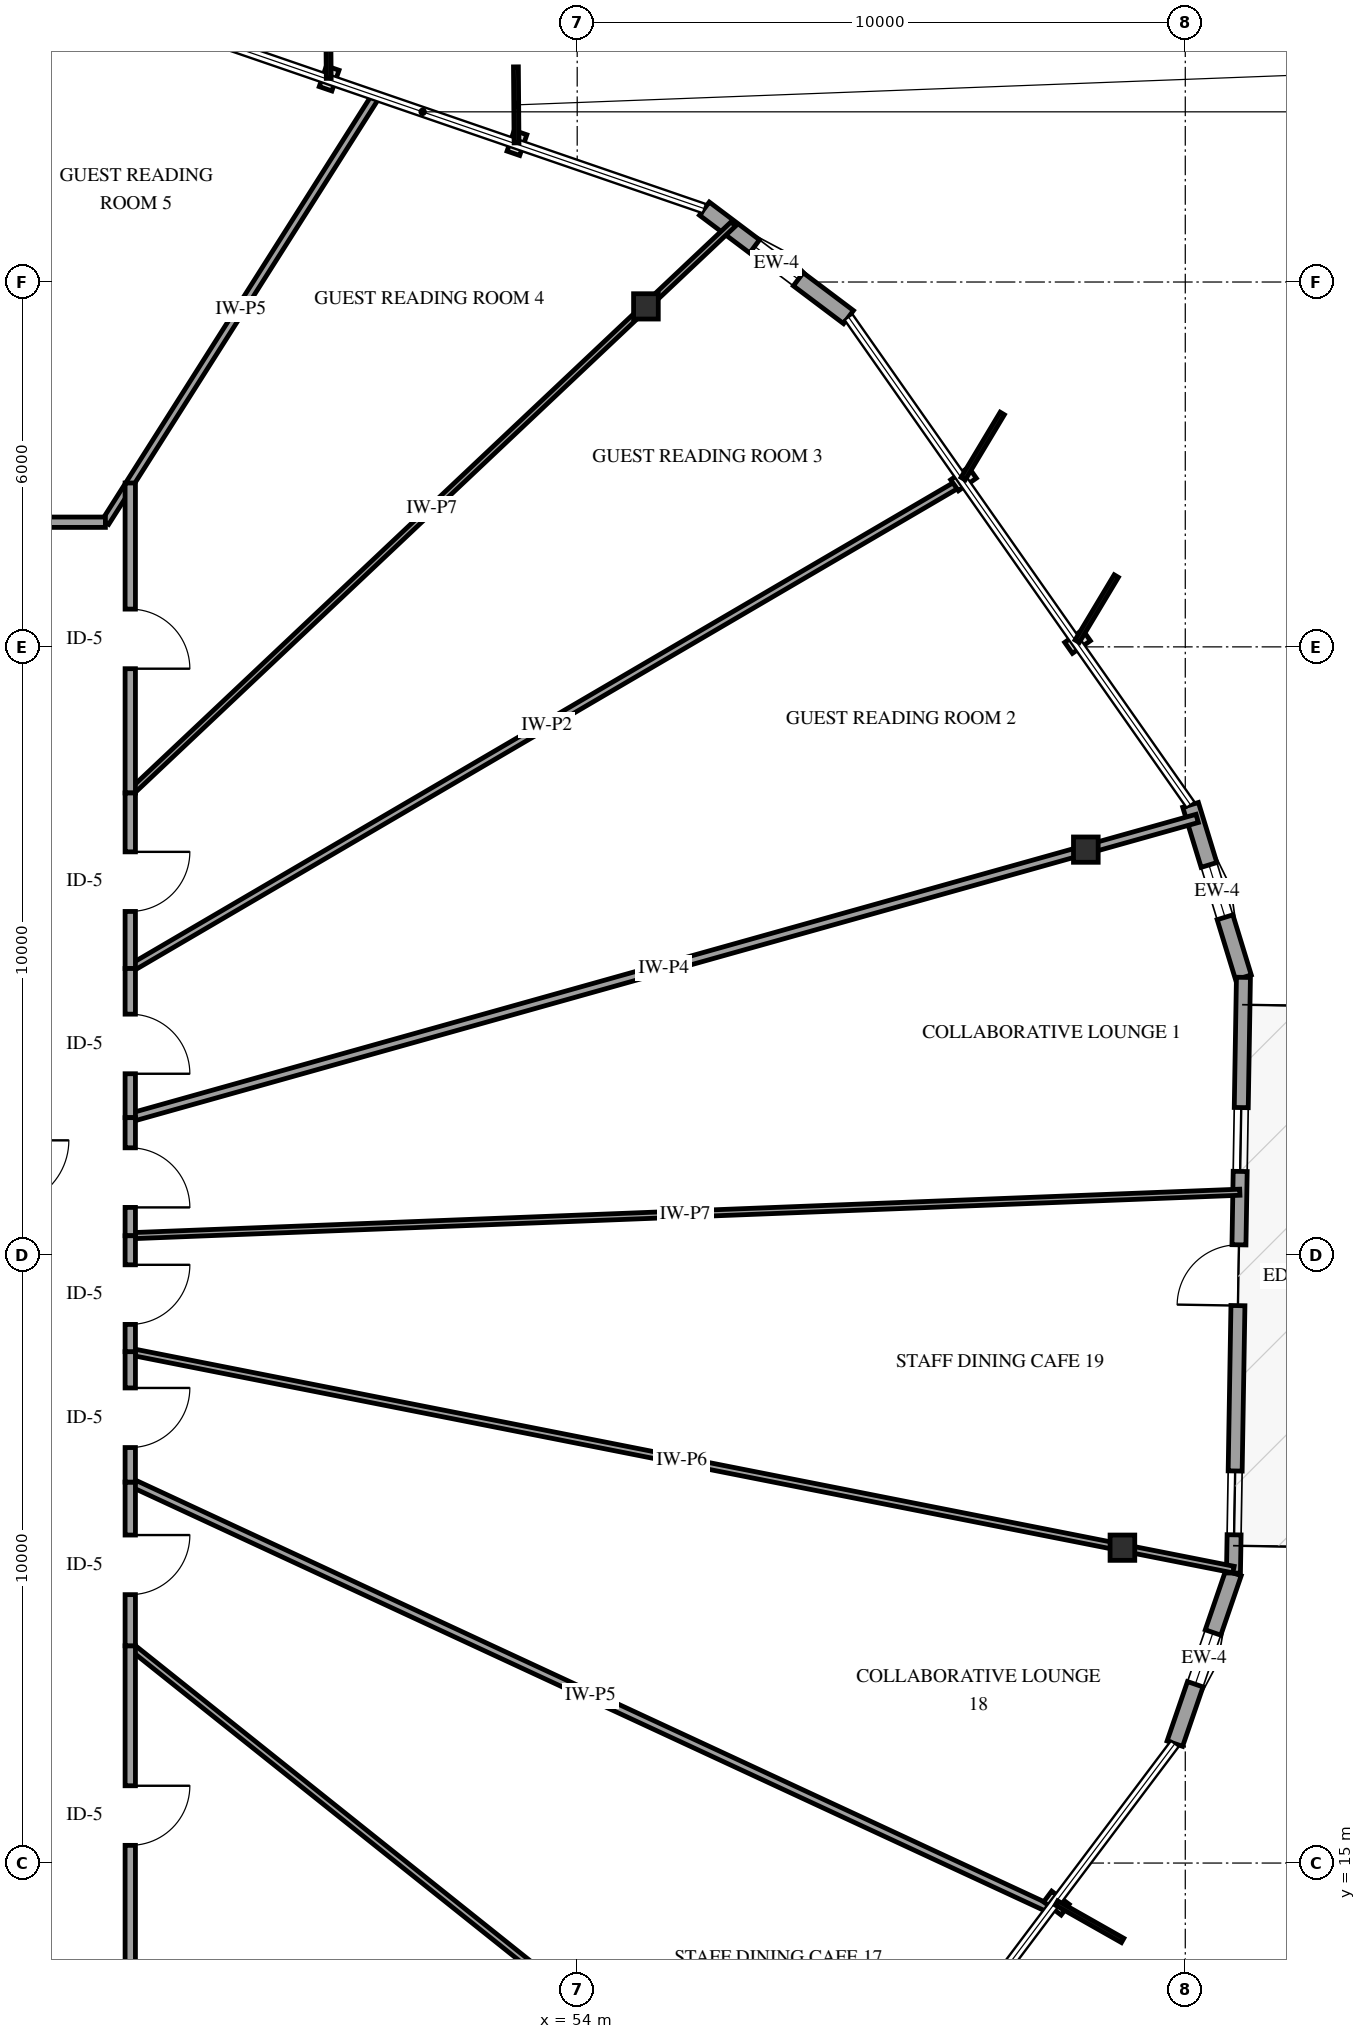
"""IFC4 building model, lengths in metres.
Left out: names, types, materials, properties, quantities, classifications, styles, units other than length and angle.
Written with IfcOpenShell. Run it as: python <this file> out.ifc"""

import sys

from ifc_helpers import new_model, si_unit, direction, frame, frame_2d, origin, origin_2d, place, context, subcontext, project, spatial, rectangle, i_section, extrude, element, fill, save


model = new_model("IFC4")
c1 = context("Model", 3, precision=1e-05, world=origin(), true_north=direction((0.0, 1.0)))
c2 = subcontext(c1, "Body", "Model", "MODEL_VIEW")
j1 = project(units=[si_unit("LENGTHUNIT", "METRE"), si_unit("PLANEANGLEUNIT", "RADIAN")], contexts=[c1])
p1 = place(None, origin())
s1 = spatial("IfcSite", under=j1, at=p1, CompositionType="ELEMENT")
p2 = place(p1, origin())
s2 = spatial("IfcBuilding", under=s1, at=p2, CompositionType="ELEMENT")
p3 = place(p2, frame((0.0, 0.0, 226.6)))
s3 = spatial("IfcBuildingStorey", under=s2, at=p3, CompositionType="ELEMENT", Elevation=226.6)
for number, where, z_axis, x_axis in (
    (1, (62.365, 31.666, 0.0), (0.0, 0.0, 1.0), (1.0, 0.0, 0.0)),
    (2, (55.13, 40.599, 0.0), (0.0, 0.0, 1.0), (1.0, 0.0, 0.0)),
    (3, (62.966, 20.186, 0.0), (0.0, 0.0, 1.0), (1.0, 0.0, 0.0)),
):
    element("IfcColumn", number, at=place(p3, frame(where, z_axis=z_axis, x_axis=x_axis)), inside=s3, PredefinedType="COLUMN", context=c2, shape_type="SweptSolid", body=[
        extrude(i_section(OverallWidth=0.406, OverallDepth=0.416, WebThickness=0.03, FlangeThickness=0.048, FilletRadius=0.038, at=origin_2d()), origin(), (0.0, 0.0, 1.0), 3.6),
    ])
p4 = place(p3, frame((63.828, 16.963, 0.0), z_axis=(0.0, 0.0, 1.0), x_axis=(0.324904964625, 0.945746670077, 0.0)))
e4 = element("IfcWall", 4, at=p4, inside=s3, PredefinedType="SOLIDWALL", context=c2, shape_type="SweptSolid", body=[
    extrude(rectangle(XDim=2.967, YDim=0.27, at=frame_2d((1.483, 0.0))), origin(), (0.0, 0.0, 1.0), 2.679),
])
p5 = place(p4, frame((1.033, 0.0, 0.75)))
e5 = element("IfcOpeningElement", 5, at=p5, cuts=e4, PredefinedType="OPENING", context=c2, shape_type="SweptSolid", body=[
    extrude(rectangle(XDim=0.9, YDim=1.5, at=frame_2d((0.45, 0.75))), frame((0.0, 0.145, 0.0), z_axis=(0.0, -1.0, 0.0), x_axis=(1.0, 0.0, 0.0)), (0.0, 0.0, 1.0), 0.29),
])
p6 = place(p3, frame((64.956, 29.565, 0.0), z_axis=(0.0, 0.0, 1.0), x_axis=(-0.293050545602, 0.95609694996, 0.0)))
e6 = element("IfcWall", 6, at=p6, inside=s3, PredefinedType="SOLIDWALL", context=c2, shape_type="SweptSolid", body=[
    extrude(rectangle(XDim=2.967, YDim=0.27, at=frame_2d((1.483, 0.0))), origin(), (0.0, 0.0, 1.0), 2.679),
])
p7 = place(p6, frame((1.033, 0.0, 0.75)))
e7 = element("IfcOpeningElement", 7, at=p7, cuts=e6, PredefinedType="OPENING", context=c2, shape_type="SweptSolid", body=[
    extrude(rectangle(XDim=0.9, YDim=1.5, at=frame_2d((0.45, 0.75))), frame((0.0, 0.145, 0.0), z_axis=(0.0, -1.0, 0.0), x_axis=(1.0, 0.0, 0.0)), (0.0, 0.0, 1.0), 0.29),
])
p8 = place(p3, frame((64.792, 19.769, 0.0), z_axis=(0.0, 0.0, 1.0), x_axis=(0.016744898116, 0.999859794365, 0.0)))
e8 = element("IfcWall", 8, at=p8, inside=s3, PredefinedType="SOLIDWALL", context=c2, shape_type="SweptSolid", body=[
    extrude(rectangle(XDim=9.798, YDim=0.23, at=frame_2d((4.899, 0.0))), origin(), (0.0, 0.0, 1.0), 2.679),
])
p9 = place(p8, frame((4.399, 0.0, 0.0)))
e9 = element("IfcOpeningElement", 9, at=p9, cuts=e8, PredefinedType="OPENING", context=c2, shape_type="SweptSolid", body=[
    extrude(rectangle(XDim=1.0, YDim=2.15, at=frame_2d((0.5, 1.075))), frame((0.0, 0.125, 0.0), z_axis=(0.0, -1.0, 0.0), x_axis=(1.0, 0.0, 0.0)), (0.0, 0.0, 1.0), 0.25),
])
p10 = place(p8, frame((0.629, 0.0, 0.72)))
e10 = element("IfcOpeningElement", 10, at=p10, cuts=e8, PredefinedType="OPENING", context=c2, shape_type="SweptSolid", body=[
    extrude(rectangle(XDim=1.05, YDim=1.55, at=frame_2d((0.525, 0.775))), frame((0.0, 0.125, 0.0), z_axis=(0.0, -1.0, 0.0), x_axis=(1.0, 0.0, 0.0)), (0.0, 0.0, 1.0), 0.25),
])
p11 = place(p8, frame((6.606, 0.0, 0.72)))
e11 = element("IfcOpeningElement", 11, at=p11, cuts=e8, PredefinedType="OPENING", context=c2, shape_type="SweptSolid", body=[
    extrude(rectangle(XDim=1.05, YDim=1.55, at=frame_2d((0.525, 0.775))), frame((0.0, 0.125, 0.0), z_axis=(0.0, -1.0, 0.0), x_axis=(1.0, 0.0, 0.0)), (0.0, 0.0, 1.0), 0.25),
])
p12 = place(p3, frame((58.462, 40.423, 0.0), z_axis=(0.0, 0.0, 1.0), x_axis=(-0.799041019951, 0.601276515786, 0.0)))
e12 = element("IfcWall", 12, at=p12, inside=s3, PredefinedType="SOLIDWALL", context=c2, shape_type="SweptSolid", body=[
    extrude(rectangle(XDim=2.967, YDim=0.27, at=frame_2d((1.483, 0.0))), origin(), (0.0, 0.0, 1.0), 2.679),
])
p13 = place(p12, frame((1.033, 0.0, 0.75)))
e13 = element("IfcOpeningElement", 13, at=p13, cuts=e12, PredefinedType="OPENING", context=c2, shape_type="SweptSolid", body=[
    extrude(rectangle(XDim=0.9, YDim=1.5, at=frame_2d((0.45, 0.75))), frame((0.0, 0.145, 0.0), z_axis=(0.0, -1.0, 0.0), x_axis=(1.0, 0.0, 0.0)), (0.0, 0.0, 1.0), 0.29),
])
p14 = place(p3, frame((46.65, 23.41, 0.0), z_axis=(0.0, 0.0, 1.0), x_axis=(0.981042007035, -0.193795202294, 0.0)))
e14 = element("IfcWall", 14, at=p14, inside=s3, PredefinedType="PARTITIONING", context=c2, shape_type="SweptSolid", body=[
    extrude(rectangle(XDim=18.494, YDim=0.11, at=frame_2d((9.247, 0.0))), origin(), (0.0, 0.0, 1.0), 2.595),
])
p15 = place(p3, frame((64.897, 26.032, 0.0), z_axis=(0.0, 0.0, 1.0), x_axis=(-0.999230893131, -0.039212526218, 0.0)))
e15 = element("IfcWall", 15, at=p15, inside=s3, PredefinedType="PARTITIONING", context=c2, shape_type="SweptSolid", body=[
    extrude(rectangle(XDim=18.261, YDim=0.1, at=frame_2d((9.131, 0.0))), origin(), (0.0, 0.0, 1.0), 3.3),
])
p16 = place(p3, frame((46.65, 27.258, 0.0), z_axis=(0.0, 0.0, 1.0), x_axis=(0.962850255887, 0.270035895277, 0.0)))
e16 = element("IfcWall", 16, at=p16, inside=s3, PredefinedType="PARTITIONING", context=c2, shape_type="SweptSolid", body=[
    extrude(rectangle(XDim=18.223, YDim=0.14, at=frame_2d((9.112, 0.0))), origin(), (0.0, 0.0, 1.0), 3.3),
])
p17 = place(p3, frame((46.65, 21.265, 0.0), z_axis=(0.0, 0.0, 1.0), x_axis=(0.907114550352, -0.420883823091, 0.0)))
e17 = element("IfcWall", 17, at=p17, inside=s3, PredefinedType="PARTITIONING", context=c2, shape_type="SweptSolid", body=[
    extrude(rectangle(XDim=16.682, YDim=0.13, at=frame_2d((8.341, 0.0))), origin(), (0.0, 0.0, 1.0), 3.3),
])
p18 = place(p3, frame((46.65, 29.711, 0.0), z_axis=(0.0, 0.0, 1.0), x_axis=(0.863115514212, 0.505006543648, 0.0)))
e18 = element("IfcWall", 18, at=p18, inside=s3, PredefinedType="PARTITIONING", context=c2, shape_type="SweptSolid", body=[
    extrude(rectangle(XDim=15.875, YDim=0.12, at=frame_2d((7.938, 0.0))), origin(), (0.0, 0.0, 1.0), 3.3),
])
p19 = place(p3, frame((46.65, 18.573, 0.0), z_axis=(0.0, 0.0, 1.0), x_axis=(0.781476039423, -0.623935252897, 0.0)))
e19 = element("IfcWall", 19, at=p19, inside=s3, PredefinedType="PARTITIONING", context=c2, shape_type="SweptSolid", body=[
    extrude(rectangle(XDim=14.7, YDim=0.11, at=frame_2d((7.35, 0.0))), origin(), (0.0, 0.0, 1.0), 3.3),
])
p20 = place(p3, frame((46.65, 32.597, 0.0), z_axis=(0.0, 0.0, 1.0), x_axis=(0.72733783117, 0.686279592695, 0.0)))
e20 = element("IfcWall", 20, at=p20, inside=s3, PredefinedType="PARTITIONING", context=c2, shape_type="SweptSolid", body=[
    extrude(rectangle(XDim=13.635, YDim=0.1, at=frame_2d((6.817, 0.0))), origin(), (0.0, 0.0, 1.0), 2.595),
])
p21 = place(p3, frame((46.241, 37.05, 0.0), z_axis=(0.0, 0.0, 1.0), x_axis=(0.535691842885, 0.844413553578, 0.0)))
e21 = element("IfcWall", 21, at=p21, inside=s3, PredefinedType="PARTITIONING", context=c2, shape_type="SweptSolid", body=[
    extrude(rectangle(XDim=8.305, YDim=0.13, at=frame_2d((4.153, 0.0))), origin(), (0.0, 0.0, 1.0), 3.3),
])
p22 = place(p3, frame((46.65, 18.573, 0.0), z_axis=(0.0, 0.0, 1.0), x_axis=(0.0, -1.0, 0.0)))
e22 = element("IfcWall", 22, at=p22, inside=s3, PredefinedType="PARTITIONING", context=c2, shape_type="SweptSolid", body=[
    extrude(rectangle(XDim=5.553, YDim=0.17, at=frame_2d((2.776, 0.0))), origin(), (0.0, 0.0, 1.0), 3.3),
])
p23 = place(p22, frame((2.302, 0.0, 0.0)))
e23 = element("IfcOpeningElement", 23, at=p23, cuts=e22, PredefinedType="OPENING", context=c2, shape_type="SweptSolid", body=[
    extrude(rectangle(XDim=0.98, YDim=2.15, at=frame_2d((0.49, 1.075))), frame((0.0, 0.095, 0.0), z_axis=(0.0, -1.0, 0.0), x_axis=(1.0, 0.0, 0.0)), (0.0, 0.0, 1.0), 0.19),
])
p24 = place(p3, frame((46.65, 37.695, 0.0), z_axis=(0.0, 0.0, 1.0), x_axis=(0.0, -1.0, 0.0)))
e24 = element("IfcWall", 24, at=p24, inside=s3, PredefinedType="PARTITIONING", context=c2, shape_type="SweptSolid", body=[
    extrude(rectangle(XDim=5.098, YDim=0.17, at=frame_2d((2.549, 0.0))), origin(), (0.0, 0.0, 1.0), 3.3),
])
p25 = place(p24, frame((2.074, 0.0, 0.0)))
e25 = element("IfcOpeningElement", 25, at=p25, cuts=e24, PredefinedType="OPENING", context=c2, shape_type="SweptSolid", body=[
    extrude(rectangle(XDim=0.98, YDim=2.15, at=frame_2d((0.49, 1.075))), frame((0.0, 0.095, 0.0), z_axis=(0.0, -1.0, 0.0), x_axis=(1.0, 0.0, 0.0)), (0.0, 0.0, 1.0), 0.19),
])
p26 = place(p3, frame((43.27, 37.05, 0.0), z_axis=(0.0, 0.0, 1.0), x_axis=(1.0, 0.0, 0.0)))
e26 = element("IfcWall", 26, at=p26, inside=s3, PredefinedType="PARTITIONING", context=c2, shape_type="SweptSolid", body=[
    extrude(rectangle(XDim=2.971, YDim=0.17, at=frame_2d((1.485, 0.0))), origin(), (0.0, 0.0, 1.0), 3.3),
])
p27 = place(p3, frame((46.65, 32.597, 0.0), z_axis=(0.0, 0.0, 1.0), x_axis=(0.0, -1.0, 0.0)))
e27 = element("IfcWall", 27, at=p27, inside=s3, PredefinedType="PARTITIONING", context=c2, shape_type="SweptSolid", body=[
    extrude(rectangle(XDim=2.886, YDim=0.17, at=frame_2d((1.443, 0.0))), origin(), (0.0, 0.0, 1.0), 3.3),
])
p28 = place(p27, frame((0.968, 0.0, 0.0)))
e28 = element("IfcOpeningElement", 28, at=p28, cuts=e27, PredefinedType="OPENING", context=c2, shape_type="SweptSolid", body=[
    extrude(rectangle(XDim=0.98, YDim=2.15, at=frame_2d((0.49, 1.075))), frame((0.0, 0.095, 0.0), z_axis=(0.0, -1.0, 0.0), x_axis=(1.0, 0.0, 0.0)), (0.0, 0.0, 1.0), 0.19),
])
p29 = place(p3, frame((46.65, 21.265, 0.0), z_axis=(0.0, 0.0, 1.0), x_axis=(0.0, -1.0, 0.0)))
e29 = element("IfcWall", 29, at=p29, inside=s3, PredefinedType="PARTITIONING", context=c2, shape_type="SweptSolid", body=[
    extrude(rectangle(XDim=2.692, YDim=0.17, at=frame_2d((1.346, 0.0))), origin(), (0.0, 0.0, 1.0), 3.3),
])
p30 = place(p29, frame((0.871, 0.0, 0.0)))
e30 = element("IfcOpeningElement", 30, at=p30, cuts=e29, PredefinedType="OPENING", context=c2, shape_type="SweptSolid", body=[
    extrude(rectangle(XDim=0.98, YDim=2.15, at=frame_2d((0.49, 1.075))), frame((0.0, 0.095, 0.0), z_axis=(0.0, -1.0, 0.0), x_axis=(1.0, 0.0, 0.0)), (0.0, 0.0, 1.0), 0.19),
])
p31 = place(p3, frame((46.65, 29.711, 0.0), z_axis=(0.0, 0.0, 1.0), x_axis=(0.0, -1.0, 0.0)))
e31 = element("IfcWall", 31, at=p31, inside=s3, PredefinedType="PARTITIONING", context=c2, shape_type="SweptSolid", body=[
    extrude(rectangle(XDim=2.453, YDim=0.17, at=frame_2d((1.227, 0.0))), origin(), (0.0, 0.0, 1.0), 3.3),
])
p32 = place(p31, frame((0.751, 0.0, 0.0)))
e32 = element("IfcOpeningElement", 32, at=p32, cuts=e31, PredefinedType="OPENING", context=c2, shape_type="SweptSolid", body=[
    extrude(rectangle(XDim=0.98, YDim=2.15, at=frame_2d((0.49, 1.075))), frame((0.0, 0.095, 0.0), z_axis=(0.0, -1.0, 0.0), x_axis=(1.0, 0.0, 0.0)), (0.0, 0.0, 1.0), 0.19),
])
p33 = place(p3, frame((46.65, 23.41, 0.0), z_axis=(0.0, 0.0, 1.0), x_axis=(0.0, -1.0, 0.0)))
e33 = element("IfcWall", 33, at=p33, inside=s3, PredefinedType="PARTITIONING", context=c2, shape_type="SweptSolid", body=[
    extrude(rectangle(XDim=2.145, YDim=0.17, at=frame_2d((1.073, 0.0))), origin(), (0.0, 0.0, 1.0), 3.3),
])
p34 = place(p33, frame((0.597, 0.0, 0.0)))
e34 = element("IfcOpeningElement", 34, at=p34, cuts=e33, PredefinedType="OPENING", context=c2, shape_type="SweptSolid", body=[
    extrude(rectangle(XDim=0.98, YDim=2.15, at=frame_2d((0.49, 1.075))), frame((0.0, 0.095, 0.0), z_axis=(0.0, -1.0, 0.0), x_axis=(1.0, 0.0, 0.0)), (0.0, 0.0, 1.0), 0.19),
])
p35 = place(p3, frame((46.65, 27.258, 0.0), z_axis=(0.0, 0.0, 1.0), x_axis=(0.0, -1.0, 0.0)))
e35 = element("IfcWall", 35, at=p35, inside=s3, PredefinedType="PARTITIONING", context=c2, shape_type="SweptSolid", body=[
    extrude(rectangle(XDim=1.942, YDim=0.17, at=frame_2d((0.971, 0.0))), origin(), (0.0, 0.0, 1.0), 3.3),
])
p36 = place(p35, frame((0.496, 0.0, 0.0)))
e36 = element("IfcOpeningElement", 36, at=p36, cuts=e35, PredefinedType="OPENING", context=c2, shape_type="SweptSolid", body=[
    extrude(rectangle(XDim=0.98, YDim=2.15, at=frame_2d((0.49, 1.075))), frame((0.0, 0.095, 0.0), z_axis=(0.0, -1.0, 0.0), x_axis=(1.0, 0.0, 0.0)), (0.0, 0.0, 1.0), 0.19),
])
p37 = place(p3, frame((46.65, 25.316, 0.0), z_axis=(0.0, 0.0, 1.0), x_axis=(0.0, -1.0, 0.0)))
e37 = element("IfcWall", 37, at=p37, inside=s3, PredefinedType="PARTITIONING", context=c2, shape_type="SweptSolid", body=[
    extrude(rectangle(XDim=1.906, YDim=0.17, at=frame_2d((0.953, 0.0))), origin(), (0.0, 0.0, 1.0), 3.3),
])
p38 = place(p37, frame((0.478, 0.0, 0.0)))
e38 = element("IfcOpeningElement", 38, at=p38, cuts=e37, PredefinedType="OPENING", context=c2, shape_type="SweptSolid", body=[
    extrude(rectangle(XDim=0.98, YDim=2.15, at=frame_2d((0.49, 1.075))), frame((0.0, 0.095, 0.0), z_axis=(0.0, -1.0, 0.0), x_axis=(1.0, 0.0, 0.0)), (0.0, 0.0, 1.0), 0.19),
])
p39 = place(p5, origin())
e39 = element("IfcWindow", 39, at=p39, inside=s3, PartitioningType="SINGLE_PANEL", PredefinedType="WINDOW", context=c2, shape_type="SweptSolid", body=[
    extrude(rectangle(XDim=0.9, YDim=1.5, at=frame_2d((0.45, 0.75))), frame((0.0, 0.03, 0.0), z_axis=(0.0, -1.0, 0.0), x_axis=(1.0, 0.0, 0.0)), (0.0, 0.0, 1.0), 0.06),
])
fill(e5, e39)
p40 = place(p7, origin())
e40 = element("IfcWindow", 40, at=p40, inside=s3, PartitioningType="SINGLE_PANEL", PredefinedType="WINDOW", context=c2, shape_type="SweptSolid", body=[
    extrude(rectangle(XDim=0.9, YDim=1.5, at=frame_2d((0.45, 0.75))), frame((0.0, 0.03, 0.0), z_axis=(0.0, -1.0, 0.0), x_axis=(1.0, 0.0, 0.0)), (0.0, 0.0, 1.0), 0.06),
])
fill(e7, e40)
p41 = place(p9, origin())
e41 = element("IfcDoor", 41, at=p41, inside=s3, OperationType="SINGLE_SWING_LEFT", PredefinedType="DOOR", context=c2, shape_type="SweptSolid", body=[
    extrude(rectangle(XDim=1.0, YDim=2.15, at=frame_2d((0.5, 1.075))), frame((0.0, 0.025, 0.0), z_axis=(0.0, -1.0, 0.0), x_axis=(1.0, 0.0, 0.0)), (0.0, 0.0, 1.0), 0.05),
])
fill(e9, e41)
p42 = place(p10, origin())
e42 = element("IfcWindow", 42, at=p42, inside=s3, PartitioningType="SINGLE_PANEL", PredefinedType="WINDOW", context=c2, shape_type="SweptSolid", body=[
    extrude(rectangle(XDim=1.05, YDim=1.55, at=frame_2d((0.525, 0.775))), frame((0.0, 0.03, 0.0), z_axis=(0.0, -1.0, 0.0), x_axis=(1.0, 0.0, 0.0)), (0.0, 0.0, 1.0), 0.06),
])
fill(e10, e42)
p43 = place(p11, origin())
e43 = element("IfcWindow", 43, at=p43, inside=s3, PartitioningType="SINGLE_PANEL", PredefinedType="WINDOW", context=c2, shape_type="SweptSolid", body=[
    extrude(rectangle(XDim=1.05, YDim=1.55, at=frame_2d((0.525, 0.775))), frame((0.0, 0.03, 0.0), z_axis=(0.0, -1.0, 0.0), x_axis=(1.0, 0.0, 0.0)), (0.0, 0.0, 1.0), 0.06),
])
fill(e11, e43)
p44 = place(p13, origin())
e44 = element("IfcWindow", 44, at=p44, inside=s3, PartitioningType="SINGLE_PANEL", PredefinedType="WINDOW", context=c2, shape_type="SweptSolid", body=[
    extrude(rectangle(XDim=0.9, YDim=1.5, at=frame_2d((0.45, 0.75))), frame((0.0, 0.03, 0.0), z_axis=(0.0, -1.0, 0.0), x_axis=(1.0, 0.0, 0.0)), (0.0, 0.0, 1.0), 0.06),
])
fill(e13, e44)
p45 = place(p23, origin())
e45 = element("IfcDoor", 45, at=p45, inside=s3, OperationType="SINGLE_SWING_LEFT", PredefinedType="DOOR", context=c2, shape_type="SweptSolid", body=[
    extrude(rectangle(XDim=0.98, YDim=2.15, at=frame_2d((0.49, 1.075))), frame((0.0, 0.025, 0.0), z_axis=(0.0, -1.0, 0.0), x_axis=(1.0, 0.0, 0.0)), (0.0, 0.0, 1.0), 0.05),
])
fill(e23, e45)
p46 = place(p25, origin())
e46 = element("IfcDoor", 46, at=p46, inside=s3, OperationType="SINGLE_SWING_RIGHT", PredefinedType="DOOR", context=c2, shape_type="SweptSolid", body=[
    extrude(rectangle(XDim=0.98, YDim=2.15, at=frame_2d((0.49, 1.075))), frame((0.0, 0.025, 0.0), z_axis=(0.0, -1.0, 0.0), x_axis=(1.0, 0.0, 0.0)), (0.0, 0.0, 1.0), 0.05),
])
fill(e25, e46)
p47 = place(p28, origin())
e47 = element("IfcDoor", 47, at=p47, inside=s3, OperationType="SINGLE_SWING_LEFT", PredefinedType="DOOR", context=c2, shape_type="SweptSolid", body=[
    extrude(rectangle(XDim=0.98, YDim=2.15, at=frame_2d((0.49, 1.075))), frame((0.0, 0.025, 0.0), z_axis=(0.0, -1.0, 0.0), x_axis=(1.0, 0.0, 0.0)), (0.0, 0.0, 1.0), 0.05),
])
fill(e28, e47)
p48 = place(p30, origin())
e48 = element("IfcDoor", 48, at=p48, inside=s3, OperationType="SINGLE_SWING_LEFT", PredefinedType="DOOR", context=c2, shape_type="SweptSolid", body=[
    extrude(rectangle(XDim=0.98, YDim=2.15, at=frame_2d((0.49, 1.075))), frame((0.0, 0.025, 0.0), z_axis=(0.0, -1.0, 0.0), x_axis=(1.0, 0.0, 0.0)), (0.0, 0.0, 1.0), 0.05),
])
fill(e30, e48)
p49 = place(p32, origin())
e49 = element("IfcDoor", 49, at=p49, inside=s3, OperationType="SINGLE_SWING_RIGHT", PredefinedType="DOOR", context=c2, shape_type="SweptSolid", body=[
    extrude(rectangle(XDim=0.98, YDim=2.15, at=frame_2d((0.49, 1.075))), frame((0.0, 0.025, 0.0), z_axis=(0.0, -1.0, 0.0), x_axis=(1.0, 0.0, 0.0)), (0.0, 0.0, 1.0), 0.05),
])
fill(e32, e49)
p50 = place(p34, origin())
e50 = element("IfcDoor", 50, at=p50, inside=s3, OperationType="SINGLE_SWING_LEFT", PredefinedType="DOOR", context=c2, shape_type="SweptSolid", body=[
    extrude(rectangle(XDim=0.98, YDim=2.15, at=frame_2d((0.49, 1.075))), frame((0.0, 0.025, 0.0), z_axis=(0.0, -1.0, 0.0), x_axis=(1.0, 0.0, 0.0)), (0.0, 0.0, 1.0), 0.05),
])
fill(e34, e50)
p51 = place(p36, origin())
e51 = element("IfcDoor", 51, at=p51, inside=s3, OperationType="SINGLE_SWING_RIGHT", PredefinedType="DOOR", context=c2, shape_type="SweptSolid", body=[
    extrude(rectangle(XDim=0.98, YDim=2.15, at=frame_2d((0.49, 1.075))), frame((0.0, 0.025, 0.0), z_axis=(0.0, -1.0, 0.0), x_axis=(1.0, 0.0, 0.0)), (0.0, 0.0, 1.0), 0.05),
])
fill(e36, e51)
p52 = place(p38, origin())
e52 = element("IfcDoor", 52, at=p52, inside=s3, OperationType="SINGLE_SWING_LEFT", PredefinedType="DOOR", context=c2, shape_type="SweptSolid", body=[
    extrude(rectangle(XDim=0.98, YDim=2.15, at=frame_2d((0.49, 1.075))), frame((0.0, 0.025, 0.0), z_axis=(0.0, -1.0, 0.0), x_axis=(1.0, 0.0, 0.0)), (0.0, 0.0, 1.0), 0.05),
])
fill(e38, e52)
save(model, sys.argv[1])
